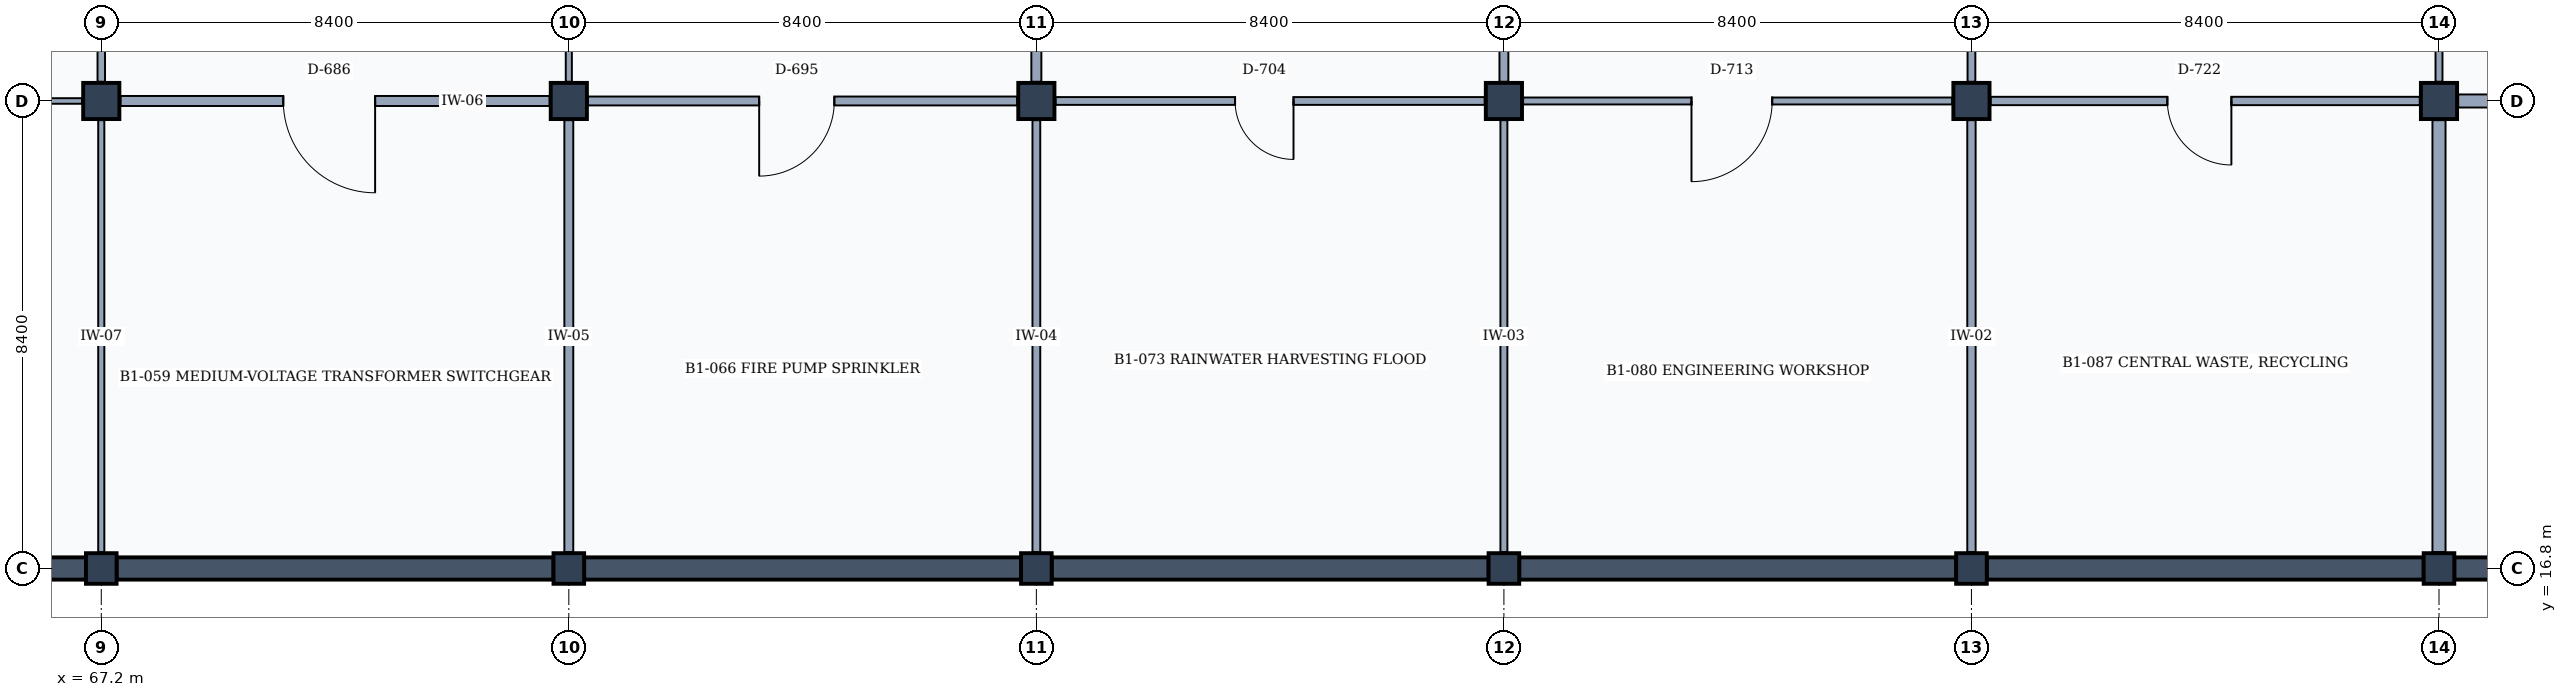
"""IFC4 building model, lengths in metres.
Left out: names, types, materials, properties, quantities, classifications, styles, units other than length and angle.
Written with IfcOpenShell. Run it as: python <this file> out.ifc"""

import sys

from ifc_helpers import new_model, si_unit, direction, frame, frame_2d, origin, origin_2d, place, context, subcontext, project, spatial, rectangle, extrude, element, fill, save


model = new_model("IFC4")
c1 = context("Model", 3, precision=1e-05, world=origin(), true_north=direction((0.0, 1.0)))
c2 = subcontext(c1, "Body", "Model", "MODEL_VIEW")
j1 = project(units=[si_unit("LENGTHUNIT", "METRE"), si_unit("PLANEANGLEUNIT", "RADIAN")], contexts=[c1])
p1 = place(None, origin())
s1 = spatial("IfcSite", under=j1, at=p1, CompositionType="ELEMENT")
p2 = place(p1, origin())
s2 = spatial("IfcBuilding", under=s1, at=p2, CompositionType="ELEMENT")
p3 = place(p2, frame((0.0, 0.0, -4.2)))
s3 = spatial("IfcBuildingStorey", under=s2, at=p3, CompositionType="ELEMENT", Elevation=-4.2)
p4 = place(p3, frame((67.2, 16.8, 0.0), z_axis=(0.0, 0.0, 1.0), x_axis=(1.0, 0.0, 0.0)))
e1 = element("IfcColumn", 1, at=p4, inside=s3, PredefinedType="COLUMN", context=c2, shape_type="SweptSolid", body=[
    extrude(rectangle(XDim=0.55, YDim=0.55, at=origin_2d()), origin(), (0.0, 0.0, 1.0), 4.2),
])
p5 = place(p3, frame((67.2, 25.2, 0.0), z_axis=(0.0, 0.0, 1.0), x_axis=(1.0, 0.0, 0.0)))
e2 = element("IfcColumn", 2, at=p5, inside=s3, PredefinedType="COLUMN", context=c2, shape_type="SweptSolid", body=[
    extrude(rectangle(XDim=0.65, YDim=0.65, at=origin_2d()), origin(), (0.0, 0.0, 1.0), 4.2),
])
p6 = place(p3, frame((75.6, 16.8, 0.0), z_axis=(0.0, 0.0, 1.0), x_axis=(1.0, 0.0, 0.0)))
e3 = element("IfcColumn", 3, at=p6, inside=s3, PredefinedType="COLUMN", context=c2, shape_type="SweptSolid", body=[
    extrude(rectangle(XDim=0.55, YDim=0.55, at=origin_2d()), origin(), (0.0, 0.0, 1.0), 4.2),
])
p7 = place(p3, frame((75.6, 25.2, 0.0), z_axis=(0.0, 0.0, 1.0), x_axis=(1.0, 0.0, 0.0)))
e4 = element("IfcColumn", 4, at=p7, inside=s3, PredefinedType="COLUMN", context=c2, shape_type="SweptSolid", body=[
    extrude(rectangle(XDim=0.65, YDim=0.65, at=origin_2d()), origin(), (0.0, 0.0, 1.0), 4.2),
])
p8 = place(p3, frame((84.0, 16.8, 0.0), z_axis=(0.0, 0.0, 1.0), x_axis=(1.0, 0.0, 0.0)))
e5 = element("IfcColumn", 5, at=p8, inside=s3, PredefinedType="COLUMN", context=c2, shape_type="SweptSolid", body=[
    extrude(rectangle(XDim=0.55, YDim=0.55, at=origin_2d()), origin(), (0.0, 0.0, 1.0), 4.2),
])
p9 = place(p3, frame((84.0, 25.2, 0.0), z_axis=(0.0, 0.0, 1.0), x_axis=(1.0, 0.0, 0.0)))
e6 = element("IfcColumn", 6, at=p9, inside=s3, PredefinedType="COLUMN", context=c2, shape_type="SweptSolid", body=[
    extrude(rectangle(XDim=0.65, YDim=0.65, at=origin_2d()), origin(), (0.0, 0.0, 1.0), 4.2),
])
p10 = place(p3, frame((92.4, 16.8, 0.0), z_axis=(0.0, 0.0, 1.0), x_axis=(1.0, 0.0, 0.0)))
e7 = element("IfcColumn", 7, at=p10, inside=s3, PredefinedType="COLUMN", context=c2, shape_type="SweptSolid", body=[
    extrude(rectangle(XDim=0.55, YDim=0.55, at=origin_2d()), origin(), (0.0, 0.0, 1.0), 4.2),
])
p11 = place(p3, frame((92.4, 25.2, 0.0), z_axis=(0.0, 0.0, 1.0), x_axis=(1.0, 0.0, 0.0)))
e8 = element("IfcColumn", 8, at=p11, inside=s3, PredefinedType="COLUMN", context=c2, shape_type="SweptSolid", body=[
    extrude(rectangle(XDim=0.65, YDim=0.65, at=origin_2d()), origin(), (0.0, 0.0, 1.0), 4.2),
])
p12 = place(p3, frame((100.8, 16.8, 0.0), z_axis=(0.0, 0.0, 1.0), x_axis=(1.0, 0.0, 0.0)))
e9 = element("IfcColumn", 9, at=p12, inside=s3, PredefinedType="COLUMN", context=c2, shape_type="SweptSolid", body=[
    extrude(rectangle(XDim=0.55, YDim=0.55, at=origin_2d()), origin(), (0.0, 0.0, 1.0), 4.2),
])
p13 = place(p3, frame((100.8, 25.2, 0.0), z_axis=(0.0, 0.0, 1.0), x_axis=(1.0, 0.0, 0.0)))
e10 = element("IfcColumn", 10, at=p13, inside=s3, PredefinedType="COLUMN", context=c2, shape_type="SweptSolid", body=[
    extrude(rectangle(XDim=0.65, YDim=0.65, at=origin_2d()), origin(), (0.0, 0.0, 1.0), 4.2),
])
p14 = place(p3, frame((109.2, 16.8, 0.0), z_axis=(0.0, 0.0, 1.0), x_axis=(1.0, 0.0, 0.0)))
e11 = element("IfcColumn", 11, at=p14, inside=s3, PredefinedType="COLUMN", context=c2, shape_type="SweptSolid", body=[
    extrude(rectangle(XDim=0.55, YDim=0.55, at=origin_2d()), origin(), (0.0, 0.0, 1.0), 4.2),
])
p15 = place(p3, frame((109.2, 25.2, 0.0), z_axis=(0.0, 0.0, 1.0), x_axis=(1.0, 0.0, 0.0)))
e12 = element("IfcColumn", 12, at=p15, inside=s3, PredefinedType="COLUMN", context=c2, shape_type="SweptSolid", body=[
    extrude(rectangle(XDim=0.65, YDim=0.65, at=origin_2d()), origin(), (0.0, 0.0, 1.0), 4.2),
])
p16 = place(p3, frame((66.925, 16.8, 0.0), z_axis=(0.0, 0.0, 1.0), x_axis=(-1.0, 0.0, 0.0)))
e13 = element("IfcWall", 13, at=p16, inside=s3, PredefinedType="STANDARD", context=c2, shape_type="SweptSolid", body=[
    extrude(rectangle(XDim=7.8, YDim=0.4, at=frame_2d((3.9, 0.0))), origin(), (0.0, 0.0, 1.0), 3.88),
])
p17 = place(p3, frame((75.325, 16.8, 0.0), z_axis=(0.0, 0.0, 1.0), x_axis=(-1.0, 0.0, 0.0)))
e14 = element("IfcWall", 14, at=p17, inside=s3, PredefinedType="STANDARD", context=c2, shape_type="SweptSolid", body=[
    extrude(rectangle(XDim=7.85, YDim=0.4, at=frame_2d((3.925, 0.0))), origin(), (0.0, 0.0, 1.0), 3.88),
])
for number, where, z_axis, x_axis in (
    (15, (83.725, 16.8, 0.0), (0.0, 0.0, 1.0), (-1.0, 0.0, 0.0)),
    (16, (92.125, 16.8, 0.0), (0.0, 0.0, 1.0), (-1.0, 0.0, 0.0)),
):
    element("IfcWall", number, at=place(p3, frame(where, z_axis=z_axis, x_axis=x_axis)), inside=s3, PredefinedType="STANDARD", context=c2, shape_type="SweptSolid", body=[
        extrude(rectangle(XDim=7.85, YDim=0.4, at=frame_2d((3.925, 0.0))), origin(), (0.0, 0.0, 1.0), 3.88),
    ])
p18 = place(p3, frame((100.525, 16.8, 0.0), z_axis=(0.0, 0.0, 1.0), x_axis=(-1.0, 0.0, 0.0)))
e17 = element("IfcWall", 17, at=p18, inside=s3, PredefinedType="STANDARD", context=c2, shape_type="SweptSolid", body=[
    extrude(rectangle(XDim=7.85, YDim=0.4, at=frame_2d((3.925, 0.0))), origin(), (0.0, 0.0, 1.0), 3.88),
])
p19 = place(p3, frame((108.925, 16.8, 0.0), z_axis=(0.0, 0.0, 1.0), x_axis=(-1.0, 0.0, 0.0)))
e18 = element("IfcWall", 18, at=p19, inside=s3, PredefinedType="STANDARD", context=c2, shape_type="SweptSolid", body=[
    extrude(rectangle(XDim=7.85, YDim=0.4, at=frame_2d((3.925, 0.0))), origin(), (0.0, 0.0, 1.0), 3.88),
])
p20 = place(p3, frame((117.325, 16.8, 0.0), z_axis=(0.0, 0.0, 1.0), x_axis=(-1.0, 0.0, 0.0)))
e19 = element("IfcWall", 19, at=p20, inside=s3, PredefinedType="STANDARD", context=c2, shape_type="SweptSolid", body=[
    extrude(rectangle(XDim=7.85, YDim=0.4, at=frame_2d((3.925, 0.0))), origin(), (0.0, 0.0, 1.0), 3.88),
])
p21 = place(p3, frame((67.2, 17.095, 0.0), z_axis=(0.0, 0.0, 1.0), x_axis=(0.0, 1.0, 0.0)))
e20 = element("IfcWall", 20, at=p21, inside=s3, PredefinedType="PARTITIONING", context=c2, shape_type="SweptSolid", body=[
    extrude(rectangle(XDim=7.76, YDim=0.11, at=frame_2d((3.88, 0.0))), origin(), (0.0, 0.0, 1.0), 3.25),
])
p22 = place(p3, frame((59.145, 25.2, 0.0), z_axis=(0.0, 0.0, 1.0), x_axis=(1.0, 0.0, 0.0)))
e21 = element("IfcWall", 21, at=p22, inside=s3, PredefinedType="MOVABLE", context=c2, shape_type="SweptSolid", body=[
    extrude(rectangle(XDim=7.71, YDim=0.1, at=frame_2d((3.855, 0.0))), origin(), (0.0, 0.0, 1.0), 2.95),
])
p23 = place(p22, frame((3.125, 0.0, 0.0)))
e22 = element("IfcOpeningElement", 22, at=p23, cuts=e21, PredefinedType="OPENING", context=c2, shape_type="SweptSolid", body=[
    extrude(rectangle(XDim=1.25, YDim=2.3, at=frame_2d((0.625, 1.15))), frame((0.0, 0.06, 0.0), z_axis=(0.0, -1.0, 0.0), x_axis=(1.0, 0.0, 0.0)), (0.0, 0.0, 1.0), 0.12),
])
p24 = place(p3, frame((67.2, 25.545, 0.0), z_axis=(0.0, 0.0, 1.0), x_axis=(0.0, 1.0, 0.0)))
e23 = element("IfcWall", 23, at=p24, inside=s3, PredefinedType="PARTITIONING", context=c2, shape_type="SweptSolid", body=[
    extrude(rectangle(XDim=7.71, YDim=0.135, at=frame_2d((3.855, 0.0))), origin(), (0.0, 0.0, 1.0), 3.25),
])
p25 = place(p3, frame((75.6, 17.095, 0.0), z_axis=(0.0, 0.0, 1.0), x_axis=(0.0, 1.0, 0.0)))
e24 = element("IfcWall", 24, at=p25, inside=s3, PredefinedType="PARTITIONING", context=c2, shape_type="SweptSolid", body=[
    extrude(rectangle(XDim=7.76, YDim=0.16, at=frame_2d((3.88, 0.0))), origin(), (0.0, 0.0, 1.0), 3.25),
])
p26 = place(p3, frame((67.545, 25.2, 0.0), z_axis=(0.0, 0.0, 1.0), x_axis=(1.0, 0.0, 0.0)))
e25 = element("IfcWall", 25, at=p26, inside=s3, PredefinedType="PARTITIONING", context=c2, shape_type="SweptSolid", body=[
    extrude(rectangle(XDim=7.71, YDim=0.18, at=frame_2d((3.855, 0.0))), origin(), (0.0, 0.0, 1.0), 2.95),
])
p27 = place(p26, frame((2.925, 0.0, 0.0)))
e26 = element("IfcOpeningElement", 26, at=p27, cuts=e25, PredefinedType="OPENING", context=c2, shape_type="SweptSolid", body=[
    extrude(rectangle(XDim=1.65, YDim=2.25, at=frame_2d((0.825, 1.125))), frame((0.0, 0.1, 0.0), z_axis=(0.0, -1.0, 0.0), x_axis=(1.0, 0.0, 0.0)), (0.0, 0.0, 1.0), 0.2),
])
p28 = place(p3, frame((75.6, 25.545, 0.0), z_axis=(0.0, 0.0, 1.0), x_axis=(0.0, 1.0, 0.0)))
e27 = element("IfcWall", 27, at=p28, inside=s3, PredefinedType="PARTITIONING", context=c2, shape_type="SweptSolid", body=[
    extrude(rectangle(XDim=7.71, YDim=0.11, at=frame_2d((3.855, 0.0))), origin(), (0.0, 0.0, 1.0), 3.25),
])
p29 = place(p3, frame((84.0, 17.095, 0.0), z_axis=(0.0, 0.0, 1.0), x_axis=(0.0, 1.0, 0.0)))
e28 = element("IfcWall", 28, at=p29, inside=s3, PredefinedType="PARTITIONING", context=c2, shape_type="SweptSolid", body=[
    extrude(rectangle(XDim=7.76, YDim=0.14, at=frame_2d((3.88, 0.0))), origin(), (0.0, 0.0, 1.0), 3.25),
])
p30 = place(p3, frame((75.945, 25.2, 0.0), z_axis=(0.0, 0.0, 1.0), x_axis=(1.0, 0.0, 0.0)))
e29 = element("IfcWall", 29, at=p30, inside=s3, PredefinedType="PARTITIONING", context=c2, shape_type="SweptSolid", body=[
    extrude(rectangle(XDim=7.71, YDim=0.16, at=frame_2d((3.855, 0.0))), origin(), (0.0, 0.0, 1.0), 2.95),
])
p31 = place(p30, frame((3.075, 0.0, 0.0)))
e30 = element("IfcOpeningElement", 30, at=p31, cuts=e29, PredefinedType="OPENING", context=c2, shape_type="SweptSolid", body=[
    extrude(rectangle(XDim=1.35, YDim=2.25, at=frame_2d((0.675, 1.125))), frame((0.0, 0.09, 0.0), z_axis=(0.0, -1.0, 0.0), x_axis=(1.0, 0.0, 0.0)), (0.0, 0.0, 1.0), 0.18),
])
p32 = place(p3, frame((84.0, 25.545, 0.0), z_axis=(0.0, 0.0, 1.0), x_axis=(0.0, 1.0, 0.0)))
e31 = element("IfcWall", 31, at=p32, inside=s3, PredefinedType="PARTITIONING", context=c2, shape_type="SweptSolid", body=[
    extrude(rectangle(XDim=7.71, YDim=0.18, at=frame_2d((3.855, 0.0))), origin(), (0.0, 0.0, 1.0), 3.25),
])
p33 = place(p3, frame((92.4, 17.095, 0.0), z_axis=(0.0, 0.0, 1.0), x_axis=(0.0, 1.0, 0.0)))
e32 = element("IfcWall", 32, at=p33, inside=s3, PredefinedType="PARTITIONING", context=c2, shape_type="SweptSolid", body=[
    extrude(rectangle(XDim=7.76, YDim=0.125, at=frame_2d((3.88, 0.0))), origin(), (0.0, 0.0, 1.0), 3.25),
])
p34 = place(p3, frame((84.345, 25.2, 0.0), z_axis=(0.0, 0.0, 1.0), x_axis=(1.0, 0.0, 0.0)))
e33 = element("IfcWall", 33, at=p34, inside=s3, PredefinedType="PARTITIONING", context=c2, shape_type="SweptSolid", body=[
    extrude(rectangle(XDim=7.71, YDim=0.14, at=frame_2d((3.855, 0.0))), origin(), (0.0, 0.0, 1.0), 2.95),
])
p35 = place(p34, frame((3.225, 0.0, 0.0)))
e34 = element("IfcOpeningElement", 34, at=p35, cuts=e33, PredefinedType="OPENING", context=c2, shape_type="SweptSolid", body=[
    extrude(rectangle(XDim=1.05, YDim=2.2, at=frame_2d((0.525, 1.1))), frame((0.0, 0.08, 0.0), z_axis=(0.0, -1.0, 0.0), x_axis=(1.0, 0.0, 0.0)), (0.0, 0.0, 1.0), 0.16),
])
p36 = place(p3, frame((92.4, 25.545, 0.0), z_axis=(0.0, 0.0, 1.0), x_axis=(0.0, 1.0, 0.0)))
e35 = element("IfcWall", 35, at=p36, inside=s3, PredefinedType="PARTITIONING", context=c2, shape_type="SweptSolid", body=[
    extrude(rectangle(XDim=7.71, YDim=0.16, at=frame_2d((3.855, 0.0))), origin(), (0.0, 0.0, 1.0), 3.25),
])
p37 = place(p3, frame((100.8, 17.095, 0.0), z_axis=(0.0, 0.0, 1.0), x_axis=(0.0, 1.0, 0.0)))
e36 = element("IfcWall", 36, at=p37, inside=s3, PredefinedType="PARTITIONING", context=c2, shape_type="SweptSolid", body=[
    extrude(rectangle(XDim=7.76, YDim=0.15, at=frame_2d((3.88, 0.0))), origin(), (0.0, 0.0, 1.0), 3.25),
])
p38 = place(p3, frame((92.745, 25.2, 0.0), z_axis=(0.0, 0.0, 1.0), x_axis=(1.0, 0.0, 0.0)))
e37 = element("IfcWall", 37, at=p38, inside=s3, PredefinedType="PARTITIONING", context=c2, shape_type="SweptSolid", body=[
    extrude(rectangle(XDim=7.71, YDim=0.125, at=frame_2d((3.855, 0.0))), origin(), (0.0, 0.0, 1.0), 2.95),
])
p39 = place(p38, frame((3.025, 0.0, 0.0)))
e38 = element("IfcOpeningElement", 38, at=p39, cuts=e37, PredefinedType="OPENING", context=c2, shape_type="SweptSolid", body=[
    extrude(rectangle(XDim=1.45, YDim=2.35, at=frame_2d((0.725, 1.175))), frame((0.0, 0.073, 0.0), z_axis=(0.0, -1.0, 0.0), x_axis=(1.0, 0.0, 0.0)), (0.0, 0.0, 1.0), 0.145),
])
p40 = place(p3, frame((100.8, 25.545, 0.0), z_axis=(0.0, 0.0, 1.0), x_axis=(0.0, 1.0, 0.0)))
e39 = element("IfcWall", 39, at=p40, inside=s3, PredefinedType="PARTITIONING", context=c2, shape_type="SweptSolid", body=[
    extrude(rectangle(XDim=7.71, YDim=0.14, at=frame_2d((3.855, 0.0))), origin(), (0.0, 0.0, 1.0), 3.25),
])
p41 = place(p3, frame((109.2, 17.095, 0.0), z_axis=(0.0, 0.0, 1.0), x_axis=(0.0, 1.0, 0.0)))
e40 = element("IfcWall", 40, at=p41, inside=s3, PredefinedType="PARTITIONING", context=c2, shape_type="SweptSolid", body=[
    extrude(rectangle(XDim=7.76, YDim=0.235, at=frame_2d((3.88, 0.0))), origin(), (0.0, 0.0, 1.0), 3.25),
])
p42 = place(p3, frame((101.145, 25.2, 0.0), z_axis=(0.0, 0.0, 1.0), x_axis=(1.0, 0.0, 0.0)))
e41 = element("IfcWall", 41, at=p42, inside=s3, PredefinedType="PARTITIONING", context=c2, shape_type="SweptSolid", body=[
    extrude(rectangle(XDim=7.71, YDim=0.15, at=frame_2d((3.855, 0.0))), origin(), (0.0, 0.0, 1.0), 2.95),
])
p43 = place(p42, frame((3.175, 0.0, 0.0)))
e42 = element("IfcOpeningElement", 42, at=p43, cuts=e41, PredefinedType="OPENING", context=c2, shape_type="SweptSolid", body=[
    extrude(rectangle(XDim=1.15, YDim=2.25, at=frame_2d((0.575, 1.125))), frame((0.0, 0.085, 0.0), z_axis=(0.0, -1.0, 0.0), x_axis=(1.0, 0.0, 0.0)), (0.0, 0.0, 1.0), 0.17),
])
p44 = place(p3, frame((109.2, 25.545, 0.0), z_axis=(0.0, 0.0, 1.0), x_axis=(0.0, 1.0, 0.0)))
e43 = element("IfcWall", 43, at=p44, inside=s3, PredefinedType="PARTITIONING", context=c2, shape_type="SweptSolid", body=[
    extrude(rectangle(XDim=7.71, YDim=0.125, at=frame_2d((3.855, 0.0))), origin(), (0.0, 0.0, 1.0), 3.25),
])
p45 = place(p3, frame((109.545, 25.2, 0.0), z_axis=(0.0, 0.0, 1.0), x_axis=(1.0, 0.0, 0.0)))
e44 = element("IfcWall", 44, at=p45, inside=s3, PredefinedType="PARTITIONING", context=c2, shape_type="SweptSolid", body=[
    extrude(rectangle(XDim=7.71, YDim=0.235, at=frame_2d((3.855, 0.0))), origin(), (0.0, 0.0, 1.0), 2.95),
])
p46 = place(p45, frame((3.025, 0.0, 0.0)))
e45 = element("IfcOpeningElement", 45, at=p46, cuts=e44, PredefinedType="OPENING", context=c2, shape_type="SweptSolid", body=[
    extrude(rectangle(XDim=1.45, YDim=2.35, at=frame_2d((0.725, 1.175))), frame((0.0, 0.127, 0.0), z_axis=(0.0, -1.0, 0.0), x_axis=(1.0, 0.0, 0.0)), (0.0, 0.0, 1.0), 0.255),
])
p47 = place(p27, frame((1.65, 0.0, 0.0), z_axis=(0.0, 0.0, 1.0), x_axis=(-1.0, 0.0, 0.0)))
e46 = element("IfcDoor", 46, at=p47, inside=s3, OperationType="SINGLE_SWING_LEFT", PredefinedType="DOOR", context=c2, shape_type="SweptSolid", body=[
    extrude(rectangle(XDim=1.65, YDim=2.25, at=frame_2d((0.825, 1.125))), frame((0.0, 0.025, 0.0), z_axis=(0.0, -1.0, 0.0), x_axis=(1.0, 0.0, 0.0)), (0.0, 0.0, 1.0), 0.05),
])
fill(e26, e46)
p48 = place(p31, frame((1.35, 0.0, 0.0), z_axis=(0.0, 0.0, 1.0), x_axis=(-1.0, 0.0, 0.0)))
e47 = element("IfcDoor", 47, at=p48, inside=s3, OperationType="SINGLE_SWING_RIGHT", PredefinedType="DOOR", context=c2, shape_type="SweptSolid", body=[
    extrude(rectangle(XDim=1.35, YDim=2.25, at=frame_2d((0.675, 1.125))), frame((0.0, 0.025, 0.0), z_axis=(0.0, -1.0, 0.0), x_axis=(1.0, 0.0, 0.0)), (0.0, 0.0, 1.0), 0.05),
])
fill(e30, e47)
p49 = place(p35, frame((1.05, 0.0, 0.0), z_axis=(0.0, 0.0, 1.0), x_axis=(-1.0, 0.0, 0.0)))
e48 = element("IfcDoor", 48, at=p49, inside=s3, OperationType="SINGLE_SWING_LEFT", PredefinedType="DOOR", context=c2, shape_type="SweptSolid", body=[
    extrude(rectangle(XDim=1.05, YDim=2.2, at=frame_2d((0.525, 1.1))), frame((0.0, 0.025, 0.0), z_axis=(0.0, -1.0, 0.0), x_axis=(1.0, 0.0, 0.0)), (0.0, 0.0, 1.0), 0.05),
])
fill(e34, e48)
p50 = place(p39, frame((1.45, 0.0, 0.0), z_axis=(0.0, 0.0, 1.0), x_axis=(-1.0, 0.0, 0.0)))
e49 = element("IfcDoor", 49, at=p50, inside=s3, OperationType="SINGLE_SWING_RIGHT", PredefinedType="DOOR", context=c2, shape_type="SweptSolid", body=[
    extrude(rectangle(XDim=1.45, YDim=2.35, at=frame_2d((0.725, 1.175))), frame((0.0, 0.025, 0.0), z_axis=(0.0, -1.0, 0.0), x_axis=(1.0, 0.0, 0.0)), (0.0, 0.0, 1.0), 0.05),
])
fill(e38, e49)
p51 = place(p43, frame((1.15, 0.0, 0.0), z_axis=(0.0, 0.0, 1.0), x_axis=(-1.0, 0.0, 0.0)))
e50 = element("IfcDoor", 50, at=p51, inside=s3, OperationType="SINGLE_SWING_LEFT", PredefinedType="DOOR", context=c2, shape_type="SweptSolid", body=[
    extrude(rectangle(XDim=1.15, YDim=2.25, at=frame_2d((0.575, 1.125))), frame((0.0, 0.025, 0.0), z_axis=(0.0, -1.0, 0.0), x_axis=(1.0, 0.0, 0.0)), (0.0, 0.0, 1.0), 0.05),
])
fill(e42, e50)
save(model, sys.argv[1])
